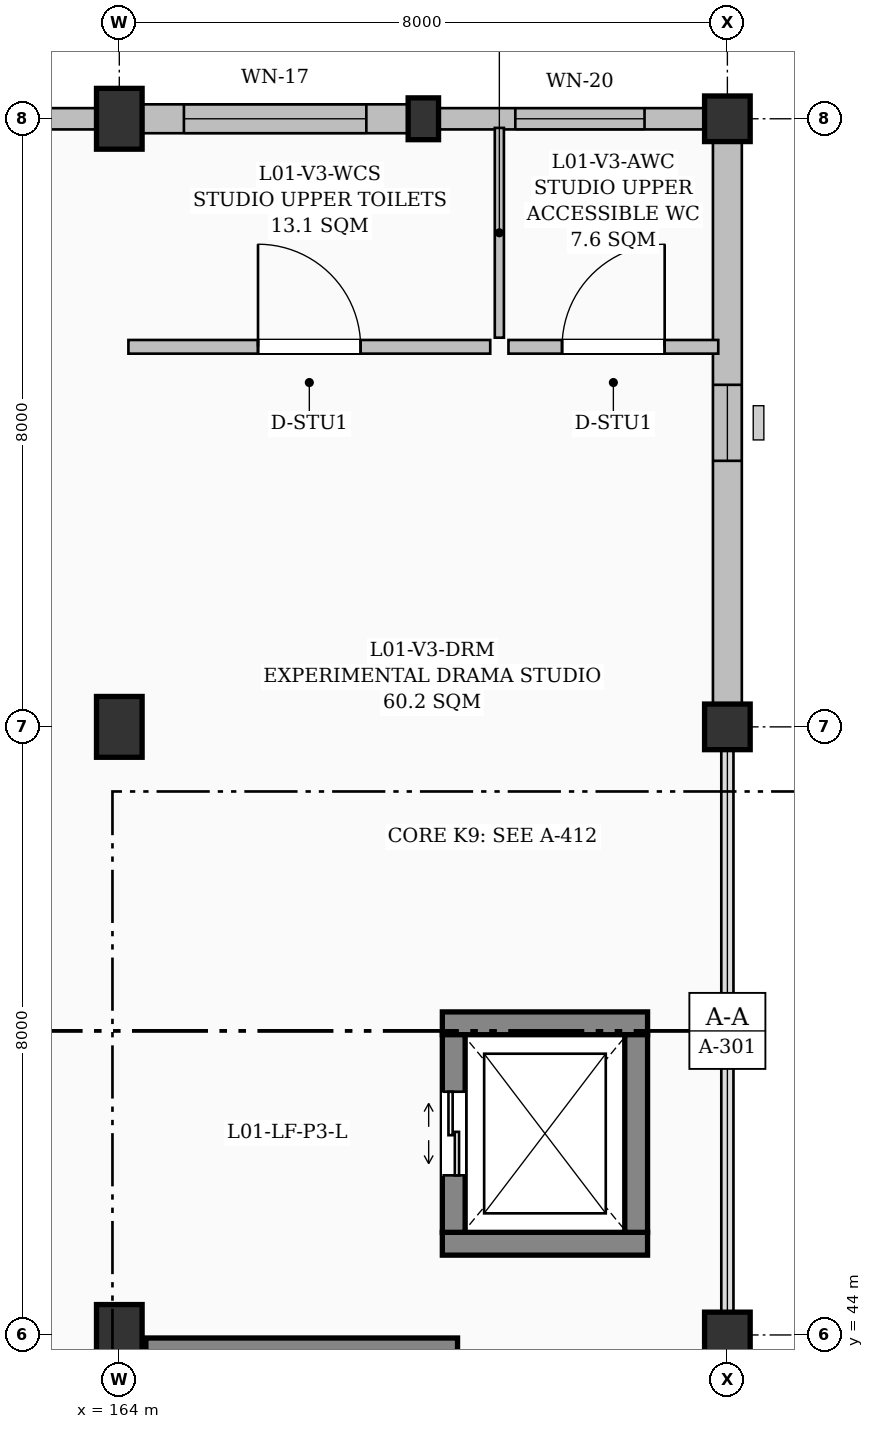
"""IFC4 building model, lengths in metres.
Left out: names, types, materials, properties, quantities, classifications, styles, units other than length and angle.
Written with IfcOpenShell. Run it as: python <this file> out.ifc"""

import sys

from ifc_helpers import new_model, si_unit, direction, frame, frame_2d, origin, origin_2d, place, context, subcontext, project, spatial, rectangle, extrude, element, fill, save


model = new_model("IFC4")
c1 = context("Model", 3, precision=1e-05, world=origin(), true_north=direction((0.0, 1.0)))
c2 = subcontext(c1, "Body", "Model", "MODEL_VIEW")
j1 = project(units=[si_unit("LENGTHUNIT", "METRE"), si_unit("PLANEANGLEUNIT", "RADIAN")], contexts=[c1])
p1 = place(None, origin())
s1 = spatial("IfcSite", under=j1, at=p1, CompositionType="ELEMENT")
p2 = place(p1, origin())
s2 = spatial("IfcBuilding", under=s1, at=p2, CompositionType="ELEMENT")
p3 = place(p2, frame((0.0, 0.0, 4.8)))
s3 = spatial("IfcBuildingStorey", under=s2, at=p3, CompositionType="ELEMENT", Elevation=4.8)
for number, where, z_axis, x_axis in (
    (1, (164.0, 44.0, 0.0), (0.0, 0.0, 1.0), (1.0, 0.0, 0.0)),
    (2, (164.0, 52.0, 0.0), (0.0, 0.0, 1.0), (1.0, 0.0, 0.0)),
    (3, (164.0, 60.0, 0.0), (0.0, 0.0, 1.0), (1.0, 0.0, 0.0)),
):
    element("IfcColumn", number, at=place(p3, frame(where, z_axis=z_axis, x_axis=x_axis)), inside=s3, PredefinedType="COLUMN", context=c2, shape_type="SweptSolid", body=[
        extrude(rectangle(XDim=0.6, YDim=0.8, at=origin_2d()), origin(), (0.0, 0.0, 1.0), 4.5),
    ])
p4 = place(p3, frame((168.0, 60.0, 0.0), z_axis=(0.0, 0.0, 1.0), x_axis=(1.0, 0.0, 0.0)))
e4 = element("IfcColumn", 4, at=p4, inside=s3, PredefinedType="PILASTER", context=c2, shape_type="SweptSolid", body=[
    extrude(rectangle(XDim=0.4, YDim=0.55, at=origin_2d()), origin(), (0.0, 0.0, 1.0), 4.5),
])
for number, where, z_axis, x_axis in (
    (5, (172.0, 44.0, 0.0), (0.0, 0.0, 1.0), (1.0, 0.0, 0.0)),
    (6, (172.0, 52.0, 0.0), (0.0, 0.0, 1.0), (1.0, 0.0, 0.0)),
    (7, (172.0, 60.0, 0.0), (0.0, 0.0, 1.0), (1.0, 0.0, 0.0)),
):
    element("IfcColumn", number, at=place(p3, frame(where, z_axis=z_axis, x_axis=x_axis)), inside=s3, PredefinedType="COLUMN", context=c2, shape_type="SweptSolid", body=[
        extrude(rectangle(XDim=0.6, YDim=0.6, at=origin_2d()), origin(), (0.0, 0.0, 1.0), 4.5),
    ])
p5 = place(p3, frame((160.225, 60.0, 0.0), z_axis=(0.0, 0.0, 1.0), x_axis=(1.0, 0.0, 0.0)))
e8 = element("IfcWall", 8, at=p5, inside=s3, PredefinedType="SOLIDWALL", context=c2, shape_type="SweptSolid", body=[
    extrude(rectangle(XDim=3.475, YDim=0.28, at=frame_2d((1.737, 0.0))), origin(), (0.0, 0.0, 1.0), 3.635),
])
p6 = place(p5, frame((1.087, 0.0, 0.95)))
e9 = element("IfcOpeningElement", 9, at=p6, cuts=e8, PredefinedType="OPENING", context=c2, shape_type="SweptSolid", body=[
    extrude(rectangle(XDim=1.3, YDim=1.4, at=frame_2d((0.65, 0.7))), frame((0.0, 0.15, 0.0), z_axis=(0.0, -1.0, 0.0), x_axis=(1.0, 0.0, 0.0)), (0.0, 0.0, 1.0), 0.3),
])
p7 = place(p3, frame((164.3, 60.0, 0.0), z_axis=(0.0, 0.0, 1.0), x_axis=(1.0, 0.0, 0.0)))
e10 = element("IfcWall", 10, at=p7, inside=s3, PredefinedType="SOLIDWALL", context=c2, shape_type="SweptSolid", body=[
    extrude(rectangle(XDim=3.5, YDim=0.38, at=frame_2d((1.75, 0.0))), origin(), (0.0, 0.0, 1.0), 3.935),
])
p8 = place(p7, frame((0.55, 0.0, 0.95)))
e11 = element("IfcOpeningElement", 11, at=p8, cuts=e10, PredefinedType="OPENING", context=c2, shape_type="SweptSolid", body=[
    extrude(rectangle(XDim=2.4, YDim=1.2, at=frame_2d((1.2, 0.6))), frame((0.0, 0.2, 0.0), z_axis=(0.0, -1.0, 0.0), x_axis=(1.0, 0.0, 0.0)), (0.0, 0.0, 1.0), 0.4),
])
p9 = place(p3, frame((168.2, 60.0, 0.0), z_axis=(0.0, 0.0, 1.0), x_axis=(1.0, 0.0, 0.0)))
e12 = element("IfcWall", 12, at=p9, inside=s3, PredefinedType="SOLIDWALL", context=c2, shape_type="SweptSolid", body=[
    extrude(rectangle(XDim=3.5, YDim=0.28, at=frame_2d((1.75, 0.0))), origin(), (0.0, 0.0, 1.0), 3.935),
])
p10 = place(p9, frame((1.01, 0.0, 0.95)))
e13 = element("IfcOpeningElement", 13, at=p10, cuts=e12, PredefinedType="OPENING", context=c2, shape_type="SweptSolid", body=[
    extrude(rectangle(XDim=1.7, YDim=2.0, at=frame_2d((0.85, 1.0))), frame((0.0, 0.15, 0.0), z_axis=(0.0, -1.0, 0.0), x_axis=(1.0, 0.0, 0.0)), (0.0, 0.0, 1.0), 0.3),
])
p11 = place(p3, frame((172.0, 59.7, 0.0), z_axis=(0.0, 0.0, 1.0), x_axis=(0.0, -1.0, 0.0)))
e14 = element("IfcWall", 14, at=p11, inside=s3, PredefinedType="SOLIDWALL", context=c2, shape_type="SweptSolid", body=[
    extrude(rectangle(XDim=7.4, YDim=0.38, at=frame_2d((3.7, 0.0))), origin(), (0.0, 0.0, 1.0), 3.685),
])
p12 = place(p11, frame((3.2, 0.0, 0.95)))
e15 = element("IfcOpeningElement", 15, at=p12, cuts=e14, PredefinedType="OPENING", context=c2, shape_type="SweptSolid", body=[
    extrude(rectangle(XDim=1.0, YDim=1.4, at=frame_2d((0.5, 0.7))), frame((0.0, 0.2, 0.0), z_axis=(0.0, -1.0, 0.0), x_axis=(1.0, 0.0, 0.0)), (0.0, 0.0, 1.0), 0.4),
])
p13 = place(p3, frame((168.45, 43.81, 0.0), z_axis=(0.0, 0.0, 1.0), x_axis=(-1.0, 0.0, 0.0)))
e16 = element("IfcWall", 16, at=p13, inside=s3, PredefinedType="SHEAR", context=c2, shape_type="SweptSolid", body=[
    extrude(rectangle(XDim=4.1, YDim=0.3, at=frame_2d((2.05, 0.0))), origin(), (0.0, 0.0, 1.0), 4.25),
])
for number, where, z_axis, x_axis in (
    (17, (168.25, 45.2, 0.0), (0.0, 0.0, 1.0), (1.0, 0.0, 0.0)),
    (18, (170.95, 48.1, 0.0), (0.0, 0.0, 1.0), (-1.0, 0.0, 0.0)),
):
    element("IfcWall", number, at=place(p3, frame(where, z_axis=z_axis, x_axis=x_axis)), inside=s3, PredefinedType="SHEAR", context=c2, shape_type="SweptSolid", body=[
        extrude(rectangle(XDim=2.7, YDim=0.3, at=frame_2d((1.35, 0.0))), origin(), (0.0, 0.0, 1.0), 4.25),
    ])
p14 = place(p3, frame((168.4, 45.35, 0.0), z_axis=(0.0, 0.0, 1.0), x_axis=(0.0, 1.0, 0.0)))
e19 = element("IfcWall", 19, at=p14, inside=s3, PredefinedType="SHEAR", context=c2, shape_type="SweptSolid", body=[
    extrude(rectangle(XDim=2.6, YDim=0.3, at=frame_2d((1.3, 0.0))), origin(), (0.0, 0.0, 1.0), 4.25),
])
p15 = place(p14, frame((0.75, 0.0, 0.0)))
e20 = element("IfcOpeningElement", 20, at=p15, cuts=e19, PredefinedType="OPENING", context=c2, shape_type="SweptSolid", body=[
    extrude(rectangle(XDim=1.1, YDim=2.15, at=frame_2d((0.55, 1.075))), frame((0.0, 0.16, 0.0), z_axis=(0.0, -1.0, 0.0), x_axis=(1.0, 0.0, 0.0)), (0.0, 0.0, 1.0), 0.32),
])
p16 = place(p3, frame((170.8, 47.95, 0.0), z_axis=(0.0, 0.0, 1.0), x_axis=(0.0, -1.0, 0.0)))
e21 = element("IfcWall", 21, at=p16, inside=s3, PredefinedType="SHEAR", context=c2, shape_type="SweptSolid", body=[
    extrude(rectangle(XDim=2.6, YDim=0.3, at=frame_2d((1.3, 0.0))), origin(), (0.0, 0.0, 1.0), 4.25),
])
p17 = place(p3, frame((169.12, 57.0, 0.0), z_axis=(0.0, 0.0, 1.0), x_axis=(1.0, 0.0, 0.0)))
e22 = element("IfcWall", 22, at=p17, inside=s3, PredefinedType="PARTITIONING", context=c2, shape_type="SweptSolid", body=[
    extrude(rectangle(XDim=2.76, YDim=0.18, at=frame_2d((1.38, 0.0))), origin(), (0.0, 0.0, 1.0), 3.965),
])
p18 = place(p17, frame((0.705, 0.0, 0.0)))
e23 = element("IfcOpeningElement", 23, at=p18, cuts=e22, PredefinedType="OPENING", context=c2, shape_type="SweptSolid", body=[
    extrude(rectangle(XDim=1.35, YDim=2.2, at=frame_2d((0.675, 1.1))), frame((0.0, 0.1, 0.0), z_axis=(0.0, -1.0, 0.0), x_axis=(1.0, 0.0, 0.0)), (0.0, 0.0, 1.0), 0.2),
])
p19 = place(p3, frame((164.12, 57.0, 0.0), z_axis=(0.0, 0.0, 1.0), x_axis=(1.0, 0.0, 0.0)))
e24 = element("IfcWall", 24, at=p19, inside=s3, PredefinedType="PARTITIONING", context=c2, shape_type="SweptSolid", body=[
    extrude(rectangle(XDim=4.76, YDim=0.18, at=frame_2d((2.38, 0.0))), origin(), (0.0, 0.0, 1.0), 3.965),
])
p20 = place(p19, frame((1.705, 0.0, 0.0)))
e25 = element("IfcOpeningElement", 25, at=p20, cuts=e24, PredefinedType="OPENING", context=c2, shape_type="SweptSolid", body=[
    extrude(rectangle(XDim=1.35, YDim=2.2, at=frame_2d((0.675, 1.1))), frame((0.0, 0.1, 0.0), z_axis=(0.0, -1.0, 0.0), x_axis=(1.0, 0.0, 0.0)), (0.0, 0.0, 1.0), 0.2),
])
p21 = place(p3, frame((169.0, 57.12, 0.0), z_axis=(0.0, 0.0, 1.0), x_axis=(0.0, 1.0, 0.0)))
e26 = element("IfcWall", 26, at=p21, inside=s3, PredefinedType="PARTITIONING", context=c2, shape_type="SweptSolid", body=[
    extrude(rectangle(XDim=2.76, YDim=0.12, at=frame_2d((1.38, 0.0))), origin(), (0.0, 0.0, 1.0), 4.25),
])
p22 = place(p8, origin())
e27 = element("IfcWindow", 27, at=p22, inside=s3, PartitioningType="TRIPLE_PANEL_HORIZONTAL", PredefinedType="WINDOW", context=c2, shape_type="SweptSolid", body=[
    extrude(rectangle(XDim=2.4, YDim=1.2, at=frame_2d((1.2, 0.6))), frame((0.0, 0.03, 0.0), z_axis=(0.0, -1.0, 0.0), x_axis=(1.0, 0.0, 0.0)), (0.0, 0.0, 1.0), 0.06),
])
fill(e11, e27)
p23 = place(p10, origin())
e28 = element("IfcWindow", 28, at=p23, inside=s3, PartitioningType="DOUBLE_PANEL_VERTICAL", PredefinedType="WINDOW", context=c2, shape_type="SweptSolid", body=[
    extrude(rectangle(XDim=1.7, YDim=2.0, at=frame_2d((0.85, 1.0))), frame((0.0, 0.03, 0.0), z_axis=(0.0, -1.0, 0.0), x_axis=(1.0, 0.0, 0.0)), (0.0, 0.0, 1.0), 0.06),
])
fill(e13, e28)
p24 = place(p12, origin())
e29 = element("IfcWindow", 29, at=p24, inside=s3, PartitioningType="SINGLE_PANEL", PredefinedType="WINDOW", context=c2, shape_type="SweptSolid", body=[
    extrude(rectangle(XDim=1.0, YDim=1.4, at=frame_2d((0.5, 0.7))), frame((0.0, 0.03, 0.0), z_axis=(0.0, -1.0, 0.0), x_axis=(1.0, 0.0, 0.0)), (0.0, 0.0, 1.0), 0.06),
])
fill(e15, e29)
p25 = place(p15, origin())
e30 = element("IfcDoor", 30, at=p25, inside=s3, OperationType="DOUBLE_DOOR_SLIDING", PredefinedType="DOOR", context=c2, shape_type="SweptSolid", body=[
    extrude(rectangle(XDim=1.1, YDim=2.15, at=frame_2d((0.55, 1.075))), frame((0.0, 0.025, 0.0), z_axis=(0.0, -1.0, 0.0), x_axis=(1.0, 0.0, 0.0)), (0.0, 0.0, 1.0), 0.05),
])
fill(e20, e30)
p26 = place(p18, origin())
e31 = element("IfcDoor", 31, at=p26, inside=s3, OperationType="SINGLE_SWING_RIGHT", PredefinedType="DOOR", context=c2, shape_type="SweptSolid", body=[
    extrude(rectangle(XDim=1.35, YDim=2.2, at=frame_2d((0.675, 1.1))), frame((0.0, 0.025, 0.0), z_axis=(0.0, -1.0, 0.0), x_axis=(1.0, 0.0, 0.0)), (0.0, 0.0, 1.0), 0.05),
])
fill(e23, e31)
p27 = place(p20, origin())
e32 = element("IfcDoor", 32, at=p27, inside=s3, OperationType="SINGLE_SWING_LEFT", PredefinedType="DOOR", context=c2, shape_type="SweptSolid", body=[
    extrude(rectangle(XDim=1.35, YDim=2.2, at=frame_2d((0.675, 1.1))), frame((0.0, 0.025, 0.0), z_axis=(0.0, -1.0, 0.0), x_axis=(1.0, 0.0, 0.0)), (0.0, 0.0, 1.0), 0.05),
])
fill(e25, e32)
save(model, sys.argv[1])
